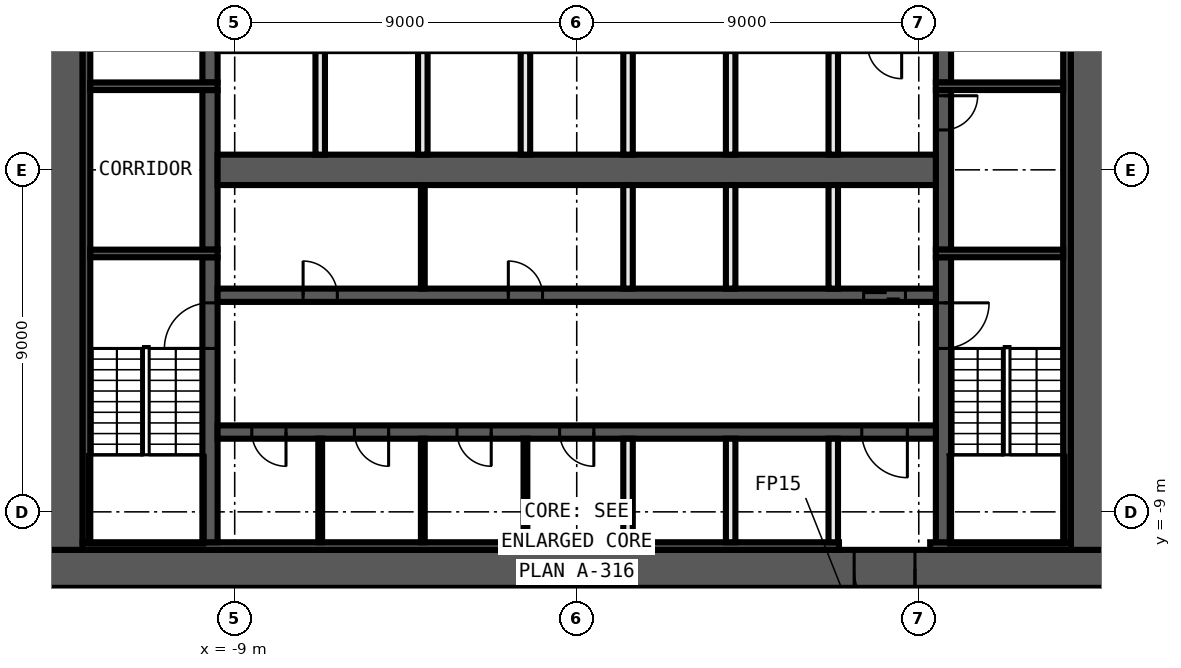
"""IFC4 building model, lengths in metres.
Left out: names, types, materials, properties, quantities, classifications, styles, units other than length and angle.
Written with IfcOpenShell. Run it as: python <this file> out.ifc"""

import sys

from ifc_helpers import new_model, si_unit, direction, frame, frame_2d, origin, place, context, subcontext, project, spatial, rectangle, extrude, element, fill, save


model = new_model("IFC4")
c1 = context("Model", 3, precision=1e-05, world=origin(), true_north=direction((0.0, 1.0)))
c2 = subcontext(c1, "Body", "Model", "MODEL_VIEW")
j1 = project(units=[si_unit("LENGTHUNIT", "METRE"), si_unit("PLANEANGLEUNIT", "RADIAN")], contexts=[c1])
p1 = place(None, origin())
s1 = spatial("IfcSite", under=j1, at=p1, CompositionType="ELEMENT")
p2 = place(p1, origin())
s2 = spatial("IfcBuilding", under=s1, at=p2, CompositionType="ELEMENT")
p3 = place(p2, frame((0.0, 0.0, 121.1)))
s3 = spatial("IfcBuildingStorey", under=s2, at=p3, CompositionType="ELEMENT", Elevation=121.1)
p4 = place(p3, frame((14.0, -10.5, 0.0), z_axis=(0.0, 0.0, 1.0), x_axis=(-1.0, 0.0, 0.0)))
e1 = element("IfcWall", 1, at=p4, inside=s3, PredefinedType="SHEAR", context=c2, shape_type="SweptSolid", body=[
    extrude(rectangle(XDim=28.0, YDim=1.0, at=frame_2d((14.0, 0.0))), origin(), (0.0, 0.0, 1.0), 3.3),
])
p5 = place(p4, frame((5.1, 0.0, 0.0)))
e2 = element("IfcOpeningElement", 2, at=p5, cuts=e1, PredefinedType="OPENING", context=c2, shape_type="SweptSolid", body=[
    extrude(rectangle(XDim=1.6, YDim=2.1, at=frame_2d((0.8, 1.05))), frame((0.0, 0.51, 0.0), z_axis=(0.0, -1.0, 0.0), x_axis=(1.0, 0.0, 0.0)), (0.0, 0.0, 1.0), 1.02),
])
for number, where, z_axis, x_axis in (
    (3, (13.5, 10.0, 0.0), (0.0, 0.0, 1.0), (0.0, -1.0, 0.0)),
    (4, (-13.5, -10.0, 0.0), (0.0, 0.0, 1.0), (0.0, 1.0, 0.0)),
):
    element("IfcWall", number, at=place(p3, frame(where, z_axis=z_axis, x_axis=x_axis)), inside=s3, PredefinedType="SHEAR", context=c2, shape_type="SweptSolid", body=[
        extrude(rectangle(XDim=20.0, YDim=1.0, at=frame_2d((10.0, 0.0))), origin(), (0.0, 0.0, 1.0), 3.3),
    ])
p6 = place(p3, frame((13.0, -9.9, 0.0), z_axis=(0.0, 0.0, 1.0), x_axis=(-1.0, 0.0, 0.0)))
e5 = element("IfcWall", 5, at=p6, inside=s3, PredefinedType="SHEAR", context=c2, shape_type="SweptSolid", body=[
    extrude(rectangle(XDim=3.7, YDim=0.2, at=frame_2d((1.85, 0.0))), origin(), (0.0, 0.0, 1.0), 3.3),
])
p7 = place(p3, frame((6.9, -9.9, 0.0), z_axis=(0.0, 0.0, 1.0), x_axis=(-1.0, 0.0, 0.0)))
e6 = element("IfcWall", 6, at=p7, inside=s3, PredefinedType="SHEAR", context=c2, shape_type="SweptSolid", body=[
    extrude(rectangle(XDim=19.9, YDim=0.2, at=frame_2d((9.95, 0.0))), origin(), (0.0, 0.0, 1.0), 3.3),
])
for number, where, z_axis, x_axis in (
    (7, (12.9, 9.8, 0.0), (0.0, 0.0, 1.0), (0.0, -1.0, 0.0)),
    (8, (-12.9, -9.8, 0.0), (0.0, 0.0, 1.0), (0.0, 1.0, 0.0)),
):
    element("IfcWall", number, at=place(p3, frame(where, z_axis=z_axis, x_axis=x_axis)), inside=s3, PredefinedType="SHEAR", context=c2, shape_type="SweptSolid", body=[
        extrude(rectangle(XDim=19.6, YDim=0.2, at=frame_2d((9.8, 0.0))), origin(), (0.0, 0.0, 1.0), 3.3),
    ])
p8 = place(p3, frame((9.65, -2.3, 0.0), z_axis=(0.0, 0.0, 1.0), x_axis=(0.0, -1.0, 0.0)))
e9 = element("IfcWall", 9, at=p8, inside=s3, PredefinedType="SHEAR", context=c2, shape_type="SweptSolid", body=[
    extrude(rectangle(XDim=7.5, YDim=0.4, at=frame_2d((3.75, 0.0))), origin(), (0.0, 0.0, 1.0), 3.3),
])
p9 = place(p8, frame((1.2, 0.0, 0.0)))
e10 = element("IfcOpeningElement", 10, at=p9, cuts=e9, PredefinedType="OPENING", context=c2, shape_type="SweptSolid", body=[
    extrude(rectangle(XDim=1.2, YDim=2.1, at=frame_2d((0.6, 1.05))), frame((0.0, 0.21, 0.0), z_axis=(0.0, -1.0, 0.0), x_axis=(1.0, 0.0, 0.0)), (0.0, 0.0, 1.0), 0.42),
])
p10 = place(p3, frame((9.65, 2.1, 0.0), z_axis=(0.0, 0.0, 1.0), x_axis=(0.0, -1.0, 0.0)))
e11 = element("IfcWall", 11, at=p10, inside=s3, PredefinedType="SHEAR", context=c2, shape_type="SweptSolid", body=[
    extrude(rectangle(XDim=4.2, YDim=0.4, at=frame_2d((2.1, 0.0))), origin(), (0.0, 0.0, 1.0), 3.3),
])
p11 = place(p10, frame((0.15, 0.0, 0.0)))
e12 = element("IfcOpeningElement", 12, at=p11, cuts=e11, PredefinedType="OPENING", context=c2, shape_type="SweptSolid", body=[
    extrude(rectangle(XDim=0.9, YDim=2.1, at=frame_2d((0.45, 1.05))), frame((0.0, 0.21, 0.0), z_axis=(0.0, -1.0, 0.0), x_axis=(1.0, 0.0, 0.0)), (0.0, 0.0, 1.0), 0.42),
])
p12 = place(p3, frame((9.65, 9.8, 0.0), z_axis=(0.0, 0.0, 1.0), x_axis=(0.0, -1.0, 0.0)))
e13 = element("IfcWall", 13, at=p12, inside=s3, PredefinedType="SHEAR", context=c2, shape_type="SweptSolid", body=[
    extrude(rectangle(XDim=7.5, YDim=0.4, at=frame_2d((3.75, 0.0))), origin(), (0.0, 0.0, 1.0), 3.3),
])
p13 = place(p12, frame((5.1, 0.0, 0.0)))
e14 = element("IfcOpeningElement", 14, at=p13, cuts=e13, PredefinedType="OPENING", context=c2, shape_type="SweptSolid", body=[
    extrude(rectangle(XDim=1.2, YDim=2.1, at=frame_2d((0.6, 1.05))), frame((0.0, 0.21, 0.0), z_axis=(0.0, -1.0, 0.0), x_axis=(1.0, 0.0, 0.0)), (0.0, 0.0, 1.0), 0.42),
])
p14 = place(p3, frame((-9.65, -9.8, 0.0), z_axis=(0.0, 0.0, 1.0), x_axis=(0.0, 1.0, 0.0)))
e15 = element("IfcWall", 15, at=p14, inside=s3, PredefinedType="SHEAR", context=c2, shape_type="SweptSolid", body=[
    extrude(rectangle(XDim=7.5, YDim=0.4, at=frame_2d((3.75, 0.0))), origin(), (0.0, 0.0, 1.0), 3.3),
])
p15 = place(p14, frame((5.1, 0.0, 0.0)))
e16 = element("IfcOpeningElement", 16, at=p15, cuts=e15, PredefinedType="OPENING", context=c2, shape_type="SweptSolid", body=[
    extrude(rectangle(XDim=1.2, YDim=2.1, at=frame_2d((0.6, 1.05))), frame((0.0, 0.21, 0.0), z_axis=(0.0, -1.0, 0.0), x_axis=(1.0, 0.0, 0.0)), (0.0, 0.0, 1.0), 0.42),
])
p16 = place(p3, frame((-9.65, -2.1, 0.0), z_axis=(0.0, 0.0, 1.0), x_axis=(0.0, 1.0, 0.0)))
e17 = element("IfcWall", 17, at=p16, inside=s3, PredefinedType="SHEAR", context=c2, shape_type="SweptSolid", body=[
    extrude(rectangle(XDim=4.2, YDim=0.4, at=frame_2d((2.1, 0.0))), origin(), (0.0, 0.0, 1.0), 3.3),
])
p17 = place(p3, frame((-9.65, 2.3, 0.0), z_axis=(0.0, 0.0, 1.0), x_axis=(0.0, 1.0, 0.0)))
e18 = element("IfcWall", 18, at=p17, inside=s3, PredefinedType="SHEAR", context=c2, shape_type="SweptSolid", body=[
    extrude(rectangle(XDim=7.5, YDim=0.4, at=frame_2d((3.75, 0.0))), origin(), (0.0, 0.0, 1.0), 3.3),
])
p18 = place(p17, frame((1.2, 0.0, 0.0)))
e19 = element("IfcOpeningElement", 19, at=p18, cuts=e18, PredefinedType="OPENING", context=c2, shape_type="SweptSolid", body=[
    extrude(rectangle(XDim=1.2, YDim=2.1, at=frame_2d((0.6, 1.05))), frame((0.0, 0.21, 0.0), z_axis=(0.0, -1.0, 0.0), x_axis=(1.0, 0.0, 0.0)), (0.0, 0.0, 1.0), 0.42),
])
for number, where, z_axis, x_axis in (
    (20, (9.45, 2.2, 0.0), (0.0, 0.0, 1.0), (1.0, 0.0, 0.0)),
    (21, (-9.45, 2.2, 0.0), (0.0, 0.0, 1.0), (-1.0, 0.0, 0.0)),
    (22, (9.45, -2.2, 0.0), (0.0, 0.0, 1.0), (1.0, 0.0, 0.0)),
    (23, (-9.45, -2.2, 0.0), (0.0, 0.0, 1.0), (-1.0, 0.0, 0.0)),
):
    element("IfcWall", number, at=place(p3, frame(where, z_axis=z_axis, x_axis=x_axis)), inside=s3, PredefinedType="SHEAR", context=c2, shape_type="SweptSolid", body=[
        extrude(rectangle(XDim=3.35, YDim=0.2, at=frame_2d((1.675, 0.0))), origin(), (0.0, 0.0, 1.0), 3.3),
    ])
p19 = place(p3, frame((-9.45, -3.3, 0.0), z_axis=(0.0, 0.0, 1.0), x_axis=(1.0, 0.0, 0.0)))
e24 = element("IfcWall", 24, at=p19, inside=s3, PredefinedType="SHEAR", context=c2, shape_type="SweptSolid", body=[
    extrude(rectangle(XDim=18.9, YDim=0.35, at=frame_2d((9.45, 0.0))), origin(), (0.0, 0.0, 1.0), 3.3),
])
p20 = place(p19, frame((17.0, 0.0, 0.0)))
e25 = element("IfcOpeningElement", 25, at=p20, cuts=e24, PredefinedType="OPENING", context=c2, shape_type="SweptSolid", body=[
    extrude(rectangle(XDim=1.1, YDim=2.1, at=frame_2d((0.55, 1.05))), frame((0.0, 0.185, 0.0), z_axis=(0.0, -1.0, 0.0), x_axis=(1.0, 0.0, 0.0)), (0.0, 0.0, 1.0), 0.37),
])
p21 = place(p19, frame((2.25, 0.0, 0.0)))
e26 = element("IfcOpeningElement", 26, at=p21, cuts=e24, PredefinedType="OPENING", context=c2, shape_type="SweptSolid", body=[
    extrude(rectangle(XDim=0.9, YDim=2.1, at=frame_2d((0.45, 1.05))), frame((0.0, 0.185, 0.0), z_axis=(0.0, -1.0, 0.0), x_axis=(1.0, 0.0, 0.0)), (0.0, 0.0, 1.0), 0.37),
])
p22 = place(p19, frame((7.65, 0.0, 0.0)))
e27 = element("IfcOpeningElement", 27, at=p22, cuts=e24, PredefinedType="OPENING", context=c2, shape_type="SweptSolid", body=[
    extrude(rectangle(XDim=0.9, YDim=2.1, at=frame_2d((0.45, 1.05))), frame((0.0, 0.185, 0.0), z_axis=(0.0, -1.0, 0.0), x_axis=(1.0, 0.0, 0.0)), (0.0, 0.0, 1.0), 0.37),
])
p23 = place(p3, frame((9.45, -6.9, 0.0), z_axis=(0.0, 0.0, 1.0), x_axis=(-1.0, 0.0, 0.0)))
e28 = element("IfcWall", 28, at=p23, inside=s3, PredefinedType="SHEAR", context=c2, shape_type="SweptSolid", body=[
    extrude(rectangle(XDim=18.9, YDim=0.35, at=frame_2d((9.45, 0.0))), origin(), (0.0, 0.0, 1.0), 3.3),
])
p24 = place(p23, frame((0.75, 0.0, 0.0)))
e29 = element("IfcOpeningElement", 29, at=p24, cuts=e28, PredefinedType="OPENING", context=c2, shape_type="SweptSolid", body=[
    extrude(rectangle(XDim=1.2, YDim=2.1, at=frame_2d((0.6, 1.05))), frame((0.0, 0.185, 0.0), z_axis=(0.0, -1.0, 0.0), x_axis=(1.0, 0.0, 0.0)), (0.0, 0.0, 1.0), 0.37),
])
p25 = place(p23, frame((17.1, 0.0, 0.0)))
e30 = element("IfcOpeningElement", 30, at=p25, cuts=e28, PredefinedType="OPENING", context=c2, shape_type="SweptSolid", body=[
    extrude(rectangle(XDim=0.9, YDim=2.1, at=frame_2d((0.45, 1.05))), frame((0.0, 0.185, 0.0), z_axis=(0.0, -1.0, 0.0), x_axis=(1.0, 0.0, 0.0)), (0.0, 0.0, 1.0), 0.37),
])
p26 = place(p23, frame((14.4, 0.0, 0.0)))
e31 = element("IfcOpeningElement", 31, at=p26, cuts=e28, PredefinedType="OPENING", context=c2, shape_type="SweptSolid", body=[
    extrude(rectangle(XDim=0.9, YDim=2.1, at=frame_2d((0.45, 1.05))), frame((0.0, 0.185, 0.0), z_axis=(0.0, -1.0, 0.0), x_axis=(1.0, 0.0, 0.0)), (0.0, 0.0, 1.0), 0.37),
])
p27 = place(p23, frame((11.7, 0.0, 0.0)))
e32 = element("IfcOpeningElement", 32, at=p27, cuts=e28, PredefinedType="OPENING", context=c2, shape_type="SweptSolid", body=[
    extrude(rectangle(XDim=0.9, YDim=2.1, at=frame_2d((0.45, 1.05))), frame((0.0, 0.185, 0.0), z_axis=(0.0, -1.0, 0.0), x_axis=(1.0, 0.0, 0.0)), (0.0, 0.0, 1.0), 0.37),
])
p28 = place(p23, frame((9.0, 0.0, 0.0)))
e33 = element("IfcOpeningElement", 33, at=p28, cuts=e28, PredefinedType="OPENING", context=c2, shape_type="SweptSolid", body=[
    extrude(rectangle(XDim=0.9, YDim=2.1, at=frame_2d((0.45, 1.05))), frame((0.0, 0.185, 0.0), z_axis=(0.0, -1.0, 0.0), x_axis=(1.0, 0.0, 0.0)), (0.0, 0.0, 1.0), 0.37),
])
p29 = place(p3, frame((-9.45, 0.0, 0.0), z_axis=(0.0, 0.0, 1.0), x_axis=(1.0, 0.0, 0.0)))
e34 = element("IfcWall", 34, at=p29, inside=s3, PredefinedType="SHEAR", context=c2, shape_type="SweptSolid", body=[
    extrude(rectangle(XDim=18.9, YDim=0.8, at=frame_2d((9.45, 0.0))), origin(), (0.0, 0.0, 1.0), 3.3),
])
for number, where, z_axis, x_axis in (
    (35, (6.75, -9.8, 0.0), (0.0, 0.0, 1.0), (0.0, 1.0, 0.0)),
    (36, (6.75, -3.125, 0.0), (0.0, 0.0, 1.0), (0.0, 1.0, 0.0)),
    (37, (6.75, 0.4, 0.0), (0.0, 0.0, 1.0), (0.0, 1.0, 0.0)),
    (38, (4.05, -9.8, 0.0), (0.0, 0.0, 1.0), (0.0, 1.0, 0.0)),
    (39, (4.05, -3.125, 0.0), (0.0, 0.0, 1.0), (0.0, 1.0, 0.0)),
    (40, (4.05, 0.4, 0.0), (0.0, 0.0, 1.0), (0.0, 1.0, 0.0)),
    (41, (1.35, -9.8, 0.0), (0.0, 0.0, 1.0), (0.0, 1.0, 0.0)),
    (42, (1.35, -3.125, 0.0), (0.0, 0.0, 1.0), (0.0, 1.0, 0.0)),
    (43, (1.35, 0.4, 0.0), (0.0, 0.0, 1.0), (0.0, 1.0, 0.0)),
):
    element("IfcWall", number, at=place(p3, frame(where, z_axis=z_axis, x_axis=x_axis)), inside=s3, PredefinedType="SOLIDWALL", context=c2, shape_type="SweptSolid", body=[
        extrude(rectangle(XDim=2.725, YDim=0.25, at=frame_2d((1.363, 0.0))), origin(), (0.0, 0.0, 1.0), 3.3),
    ])
p30 = place(p3, frame((-1.35, -9.8, 0.0), z_axis=(0.0, 0.0, 1.0), x_axis=(0.0, 1.0, 0.0)))
e44 = element("IfcWall", 44, at=p30, inside=s3, PredefinedType="PARTITIONING", context=c2, shape_type="SweptSolid", body=[
    extrude(rectangle(XDim=2.725, YDim=0.1, at=frame_2d((1.363, 0.0))), origin(), (0.0, 0.0, 1.0), 3.3),
])
p31 = place(p3, frame((-1.35, 0.4, 0.0), z_axis=(0.0, 0.0, 1.0), x_axis=(0.0, 1.0, 0.0)))
e45 = element("IfcWall", 45, at=p31, inside=s3, PredefinedType="SOLIDWALL", context=c2, shape_type="SweptSolid", body=[
    extrude(rectangle(XDim=2.725, YDim=0.25, at=frame_2d((1.363, 0.0))), origin(), (0.0, 0.0, 1.0), 3.3),
])
for number, where, z_axis, x_axis in (
    (46, (-4.05, -9.8, 0.0), (0.0, 0.0, 1.0), (0.0, 1.0, 0.0)),
    (47, (-4.05, -3.125, 0.0), (0.0, 0.0, 1.0), (0.0, 1.0, 0.0)),
):
    element("IfcWall", number, at=place(p3, frame(where, z_axis=z_axis, x_axis=x_axis)), inside=s3, PredefinedType="PARTITIONING", context=c2, shape_type="SweptSolid", body=[
        extrude(rectangle(XDim=2.725, YDim=0.1, at=frame_2d((1.363, 0.0))), origin(), (0.0, 0.0, 1.0), 3.3),
    ])
p32 = place(p3, frame((-4.05, 0.4, 0.0), z_axis=(0.0, 0.0, 1.0), x_axis=(0.0, 1.0, 0.0)))
e48 = element("IfcWall", 48, at=p32, inside=s3, PredefinedType="SOLIDWALL", context=c2, shape_type="SweptSolid", body=[
    extrude(rectangle(XDim=2.725, YDim=0.25, at=frame_2d((1.363, 0.0))), origin(), (0.0, 0.0, 1.0), 3.3),
])
p33 = place(p3, frame((-6.75, -9.8, 0.0), z_axis=(0.0, 0.0, 1.0), x_axis=(0.0, 1.0, 0.0)))
e49 = element("IfcWall", 49, at=p33, inside=s3, PredefinedType="PARTITIONING", context=c2, shape_type="SweptSolid", body=[
    extrude(rectangle(XDim=2.725, YDim=0.1, at=frame_2d((1.363, 0.0))), origin(), (0.0, 0.0, 1.0), 3.3),
])
p34 = place(p3, frame((-6.75, 0.4, 0.0), z_axis=(0.0, 0.0, 1.0), x_axis=(0.0, 1.0, 0.0)))
e50 = element("IfcWall", 50, at=p34, inside=s3, PredefinedType="SOLIDWALL", context=c2, shape_type="SweptSolid", body=[
    extrude(rectangle(XDim=2.725, YDim=0.25, at=frame_2d((1.363, 0.0))), origin(), (0.0, 0.0, 1.0), 3.3),
])
p35 = place(p11, origin())
e51 = element("IfcDoor", 51, at=p35, inside=s3, OperationType="SINGLE_SWING_RIGHT", PredefinedType="DOOR", context=c2, shape_type="SweptSolid", body=[
    extrude(rectangle(XDim=0.9, YDim=2.1, at=frame_2d((0.45, 1.05))), frame((0.0, 0.025, 0.0), z_axis=(0.0, -1.0, 0.0), x_axis=(1.0, 0.0, 0.0)), (0.0, 0.0, 1.0), 0.05),
])
fill(e12, e51)
p36 = place(p20, origin())
e52 = element("IfcDoor", 52, at=p36, inside=s3, OperationType="DOUBLE_DOOR_SLIDING", PredefinedType="DOOR", context=c2, shape_type="SweptSolid", body=[
    extrude(rectangle(XDim=1.1, YDim=2.1, at=frame_2d((0.55, 1.05))), frame((0.0, 0.025, 0.0), z_axis=(0.0, -1.0, 0.0), x_axis=(1.0, 0.0, 0.0)), (0.0, 0.0, 1.0), 0.05),
])
fill(e25, e52)
p37 = place(p5, origin())
e53 = element("IfcDoor", 53, at=p37, inside=s3, OperationType="DOUBLE_DOOR_SINGLE_SWING", PredefinedType="DOOR", context=c2, shape_type="SweptSolid", body=[
    extrude(rectangle(XDim=1.6, YDim=2.1, at=frame_2d((0.8, 1.05))), frame((0.0, 0.025, 0.0), z_axis=(0.0, -1.0, 0.0), x_axis=(1.0, 0.0, 0.0)), (0.0, 0.0, 1.0), 0.05),
])
fill(e2, e53)
p38 = place(p24, origin())
e54 = element("IfcDoor", 54, at=p38, inside=s3, OperationType="SINGLE_SWING_LEFT", PredefinedType="DOOR", context=c2, shape_type="SweptSolid", body=[
    extrude(rectangle(XDim=1.2, YDim=2.1, at=frame_2d((0.6, 1.05))), frame((0.0, 0.025, 0.0), z_axis=(0.0, -1.0, 0.0), x_axis=(1.0, 0.0, 0.0)), (0.0, 0.0, 1.0), 0.05),
])
fill(e29, e54)
p39 = place(p21, origin())
e55 = element("IfcDoor", 55, at=p39, inside=s3, OperationType="SINGLE_SWING_RIGHT", PredefinedType="DOOR", context=c2, shape_type="SweptSolid", body=[
    extrude(rectangle(XDim=0.9, YDim=2.1, at=frame_2d((0.45, 1.05))), frame((0.0, 0.025, 0.0), z_axis=(0.0, -1.0, 0.0), x_axis=(1.0, 0.0, 0.0)), (0.0, 0.0, 1.0), 0.05),
])
fill(e26, e55)
p40 = place(p22, origin())
e56 = element("IfcDoor", 56, at=p40, inside=s3, OperationType="SINGLE_SWING_LEFT", PredefinedType="DOOR", context=c2, shape_type="SweptSolid", body=[
    extrude(rectangle(XDim=0.9, YDim=2.1, at=frame_2d((0.45, 1.05))), frame((0.0, 0.025, 0.0), z_axis=(0.0, -1.0, 0.0), x_axis=(1.0, 0.0, 0.0)), (0.0, 0.0, 1.0), 0.05),
])
fill(e27, e56)
p41 = place(p25, origin())
e57 = element("IfcDoor", 57, at=p41, inside=s3, OperationType="SINGLE_SWING_RIGHT", PredefinedType="DOOR", context=c2, shape_type="SweptSolid", body=[
    extrude(rectangle(XDim=0.9, YDim=2.1, at=frame_2d((0.45, 1.05))), frame((0.0, 0.025, 0.0), z_axis=(0.0, -1.0, 0.0), x_axis=(1.0, 0.0, 0.0)), (0.0, 0.0, 1.0), 0.05),
])
fill(e30, e57)
p42 = place(p26, origin())
e58 = element("IfcDoor", 58, at=p42, inside=s3, OperationType="SINGLE_SWING_LEFT", PredefinedType="DOOR", context=c2, shape_type="SweptSolid", body=[
    extrude(rectangle(XDim=0.9, YDim=2.1, at=frame_2d((0.45, 1.05))), frame((0.0, 0.025, 0.0), z_axis=(0.0, -1.0, 0.0), x_axis=(1.0, 0.0, 0.0)), (0.0, 0.0, 1.0), 0.05),
])
fill(e31, e58)
p43 = place(p27, origin())
e59 = element("IfcDoor", 59, at=p43, inside=s3, OperationType="SINGLE_SWING_RIGHT", PredefinedType="DOOR", context=c2, shape_type="SweptSolid", body=[
    extrude(rectangle(XDim=0.9, YDim=2.1, at=frame_2d((0.45, 1.05))), frame((0.0, 0.025, 0.0), z_axis=(0.0, -1.0, 0.0), x_axis=(1.0, 0.0, 0.0)), (0.0, 0.0, 1.0), 0.05),
])
fill(e32, e59)
p44 = place(p28, origin())
e60 = element("IfcDoor", 60, at=p44, inside=s3, OperationType="SINGLE_SWING_LEFT", PredefinedType="DOOR", context=c2, shape_type="SweptSolid", body=[
    extrude(rectangle(XDim=0.9, YDim=2.1, at=frame_2d((0.45, 1.05))), frame((0.0, 0.025, 0.0), z_axis=(0.0, -1.0, 0.0), x_axis=(1.0, 0.0, 0.0)), (0.0, 0.0, 1.0), 0.05),
])
fill(e33, e60)
p45 = place(p9, origin())
e61 = element("IfcDoor", 61, at=p45, inside=s3, OperationType="SINGLE_SWING_RIGHT", PredefinedType="DOOR", context=c2, shape_type="SweptSolid", body=[
    extrude(rectangle(XDim=1.2, YDim=2.1, at=frame_2d((0.6, 1.05))), frame((0.0, 0.025, 0.0), z_axis=(0.0, -1.0, 0.0), x_axis=(1.0, 0.0, 0.0)), (0.0, 0.0, 1.0), 0.05),
])
fill(e10, e61)
p46 = place(p15, origin())
e62 = element("IfcDoor", 62, at=p46, inside=s3, OperationType="SINGLE_SWING_LEFT", PredefinedType="DOOR", context=c2, shape_type="SweptSolid", body=[
    extrude(rectangle(XDim=1.2, YDim=2.1, at=frame_2d((0.6, 1.05))), frame((0.0, 0.025, 0.0), z_axis=(0.0, -1.0, 0.0), x_axis=(1.0, 0.0, 0.0)), (0.0, 0.0, 1.0), 0.05),
])
fill(e16, e62)
save(model, sys.argv[1])
